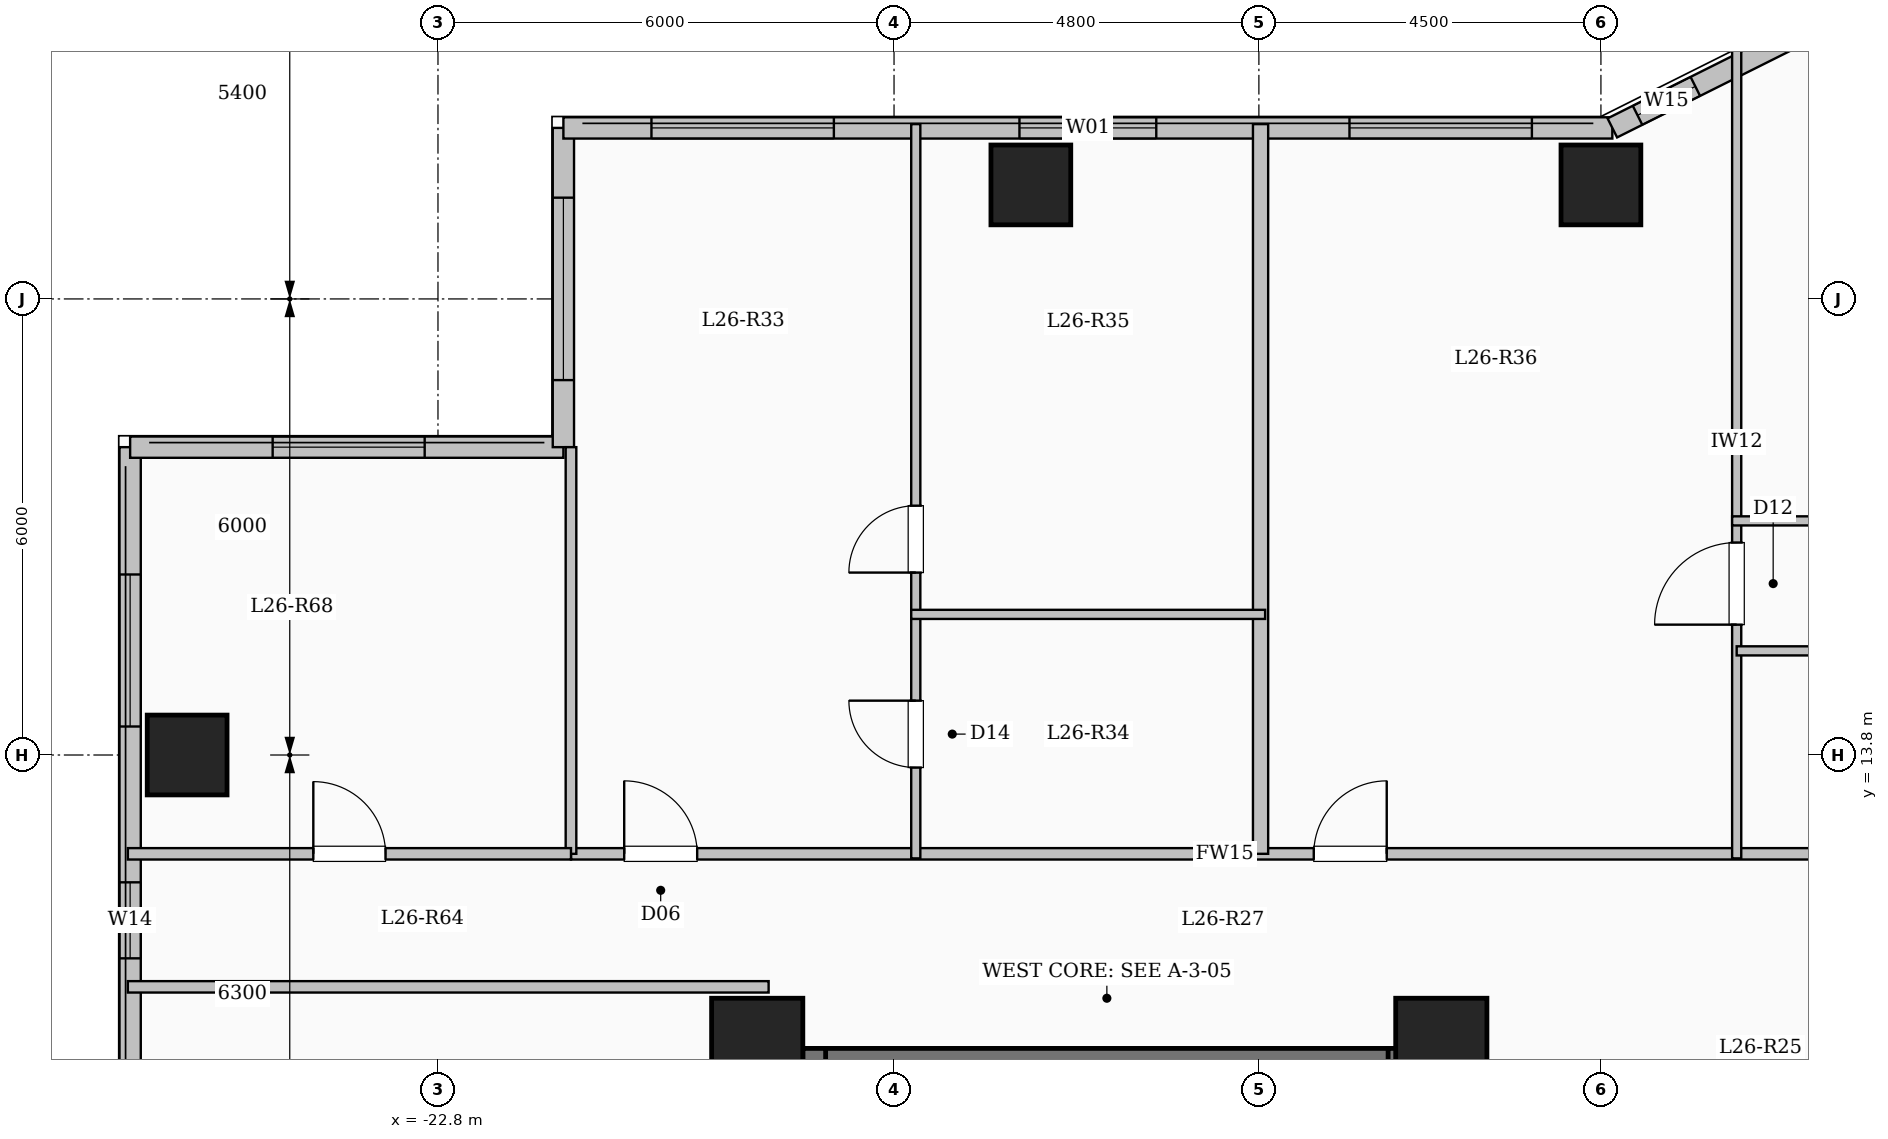
"""IFC4 building model, lengths in metres.
Left out: names, types, materials, properties, quantities, classifications, styles, units other than length and angle.
Written with IfcOpenShell. Run it as: python <this file> out.ifc"""

import sys

from ifc_helpers import new_model, si_unit, direction, frame, frame_2d, origin, origin_2d, place, context, subcontext, project, spatial, rectangle, extrude, element, fill, save


model = new_model("IFC4")
c1 = context("Model", 3, precision=1e-05, world=origin(), true_north=direction((0.0, 1.0)))
c2 = subcontext(c1, "Body", "Model", "MODEL_VIEW")
j1 = project(units=[si_unit("LENGTHUNIT", "METRE"), si_unit("PLANEANGLEUNIT", "RADIAN")], contexts=[c1])
p1 = place(None, origin())
s1 = spatial("IfcSite", under=j1, at=p1, CompositionType="ELEMENT")
p2 = place(p1, origin())
s2 = spatial("IfcBuilding", under=s1, at=p2, CompositionType="ELEMENT")
p3 = place(p2, frame((0.0, 0.0, 98.4)))
s3 = spatial("IfcBuildingStorey", under=s2, at=p3, CompositionType="ELEMENT", Elevation=98.4)
for number, where, z_axis, x_axis in (
    (1, (-9.6, 10.0, 0.0), (0.0, 0.0, 1.0), (1.0, 0.0, 0.0)),
    (2, (-18.6, 10.0, 0.0), (0.0, 0.0, 1.0), (1.0, 0.0, 0.0)),
):
    element("IfcColumn", number, at=place(p3, frame(where, z_axis=z_axis, x_axis=x_axis)), inside=s3, PredefinedType="COLUMN", context=c2, shape_type="SweptSolid", body=[
        extrude(rectangle(XDim=1.2, YDim=1.2, at=origin_2d()), origin(), (0.0, 0.0, 1.0), 3.35),
    ])
for number, where, z_axis, x_axis in (
    (3, (-15.0, 21.3, 0.0), (0.0, 0.0, 1.0), (1.0, 0.0, 0.0)),
    (4, (-7.5, 21.3, 0.0), (0.0, 0.0, 1.0), (1.0, 0.0, 0.0)),
    (5, (-26.1, 13.8, 0.0), (0.0, 0.0, 1.0), (1.0, 0.0, 0.0)),
):
    element("IfcColumn", number, at=place(p3, frame(where, z_axis=z_axis, x_axis=x_axis)), inside=s3, PredefinedType="COLUMN", context=c2, shape_type="SweptSolid", body=[
        extrude(rectangle(XDim=1.05, YDim=1.05, at=origin_2d()), origin(), (0.0, 0.0, 1.0), 3.35),
    ])
p4 = place(p3, frame((-26.85, -17.85, 0.0), z_axis=(0.0, 0.0, 1.0), x_axis=(0.0, 1.0, 0.0)))
e6 = element("IfcWall", 6, at=p4, inside=s3, PredefinedType="SOLIDWALL", context=c2, shape_type="SweptSolid", body=[
    extrude(rectangle(XDim=35.7, YDim=0.28, at=frame_2d((17.85, 0.0))), origin(), (0.0, 0.0, 1.0), 3.1),
])
p5 = place(p4, frame((2.55, 0.0, 0.9)))
e7 = element("IfcOpeningElement", 7, at=p5, cuts=e6, PredefinedType="OPENING", context=c2, shape_type="SweptSolid", body=[
    extrude(rectangle(XDim=2.4, YDim=1.8, at=frame_2d((1.2, 0.9))), frame((0.0, 0.15, 0.0), z_axis=(0.0, -1.0, 0.0), x_axis=(1.0, 0.0, 0.0)), (0.0, 0.0, 1.0), 0.3),
])
p6 = place(p4, frame((8.343, 0.0, 0.9)))
e8 = element("IfcOpeningElement", 8, at=p6, cuts=e6, PredefinedType="OPENING", context=c2, shape_type="SweptSolid", body=[
    extrude(rectangle(XDim=1.5, YDim=1.65, at=frame_2d((0.75, 0.825))), frame((0.0, 0.15, 0.0), z_axis=(0.0, -1.0, 0.0), x_axis=(1.0, 0.0, 0.0)), (0.0, 0.0, 1.0), 0.3),
])
p7 = place(p4, frame((18.6, 0.0, 0.9)))
e9 = element("IfcOpeningElement", 9, at=p7, cuts=e6, PredefinedType="OPENING", context=c2, shape_type="SweptSolid", body=[
    extrude(rectangle(XDim=2.0, YDim=1.7, at=frame_2d((1.0, 0.85))), frame((0.0, 0.15, 0.0), z_axis=(0.0, -1.0, 0.0), x_axis=(1.0, 0.0, 0.0)), (0.0, 0.0, 1.0), 0.3),
])
p8 = place(p4, frame((28.975, 0.0, 0.95)))
e10 = element("IfcOpeningElement", 10, at=p8, cuts=e6, PredefinedType="OPENING", context=c2, shape_type="SweptSolid", body=[
    extrude(rectangle(XDim=1.0, YDim=1.5, at=frame_2d((0.5, 0.75))), frame((0.0, 0.15, 0.0), z_axis=(0.0, -1.0, 0.0), x_axis=(1.0, 0.0, 0.0)), (0.0, 0.0, 1.0), 0.3),
])
p9 = place(p4, frame((32.025, 0.0, 0.9)))
e11 = element("IfcOpeningElement", 11, at=p9, cuts=e6, PredefinedType="OPENING", context=c2, shape_type="SweptSolid", body=[
    extrude(rectangle(XDim=2.0, YDim=1.7, at=frame_2d((1.0, 0.85))), frame((0.0, 0.15, 0.0), z_axis=(0.0, -1.0, 0.0), x_axis=(1.0, 0.0, 0.0)), (0.0, 0.0, 1.0), 0.3),
])
p10 = place(p3, frame((-26.85, 17.85, 0.0), z_axis=(0.0, 0.0, 1.0), x_axis=(1.0, 0.0, 0.0)))
e12 = element("IfcWall", 12, at=p10, inside=s3, PredefinedType="SOLIDWALL", context=c2, shape_type="SweptSolid", body=[
    extrude(rectangle(XDim=5.7, YDim=0.28, at=frame_2d((2.85, 0.0))), origin(), (0.0, 0.0, 1.0), 3.1),
])
p11 = place(p10, frame((1.875, 0.0, 0.9)))
e13 = element("IfcOpeningElement", 13, at=p11, cuts=e12, PredefinedType="OPENING", context=c2, shape_type="SweptSolid", body=[
    extrude(rectangle(XDim=2.0, YDim=1.7, at=frame_2d((1.0, 0.85))), frame((0.0, 0.15, 0.0), z_axis=(0.0, -1.0, 0.0), x_axis=(1.0, 0.0, 0.0)), (0.0, 0.0, 1.0), 0.3),
])
p12 = place(p3, frame((-21.15, 17.85, 0.0), z_axis=(0.0, 0.0, 1.0), x_axis=(0.0, 1.0, 0.0)))
e14 = element("IfcWall", 14, at=p12, inside=s3, PredefinedType="SOLIDWALL", context=c2, shape_type="SweptSolid", body=[
    extrude(rectangle(XDim=4.2, YDim=0.28, at=frame_2d((2.1, 0.0))), origin(), (0.0, 0.0, 1.0), 3.1),
])
p13 = place(p12, frame((0.882, 0.0, 0.9)))
e15 = element("IfcOpeningElement", 15, at=p13, cuts=e14, PredefinedType="OPENING", context=c2, shape_type="SweptSolid", body=[
    extrude(rectangle(XDim=2.4, YDim=1.8, at=frame_2d((1.2, 0.9))), frame((0.0, 0.15, 0.0), z_axis=(0.0, -1.0, 0.0), x_axis=(1.0, 0.0, 0.0)), (0.0, 0.0, 1.0), 0.3),
])
p14 = place(p3, frame((-21.15, 22.05, 0.0), z_axis=(0.0, 0.0, 1.0), x_axis=(1.0, 0.0, 0.0)))
e16 = element("IfcWall", 16, at=p14, inside=s3, PredefinedType="SOLIDWALL", context=c2, shape_type="SweptSolid", body=[
    extrude(rectangle(XDim=13.8, YDim=0.28, at=frame_2d((6.9, 0.0))), origin(), (0.0, 0.0, 1.0), 3.1),
])
p15 = place(p14, frame((1.158, 0.0, 0.9)))
e17 = element("IfcOpeningElement", 17, at=p15, cuts=e16, PredefinedType="OPENING", context=c2, shape_type="SweptSolid", body=[
    extrude(rectangle(XDim=2.4, YDim=1.8, at=frame_2d((1.2, 0.9))), frame((0.0, 0.15, 0.0), z_axis=(0.0, -1.0, 0.0), x_axis=(1.0, 0.0, 0.0)), (0.0, 0.0, 1.0), 0.3),
])
p16 = place(p14, frame((6.0, 0.0, 0.9)))
e18 = element("IfcOpeningElement", 18, at=p16, cuts=e16, PredefinedType="OPENING", context=c2, shape_type="SweptSolid", body=[
    extrude(rectangle(XDim=1.8, YDim=1.65, at=frame_2d((0.9, 0.825))), frame((0.0, 0.15, 0.0), z_axis=(0.0, -1.0, 0.0), x_axis=(1.0, 0.0, 0.0)), (0.0, 0.0, 1.0), 0.3),
])
p17 = place(p14, frame((10.342, 0.0, 0.9)))
e19 = element("IfcOpeningElement", 19, at=p17, cuts=e16, PredefinedType="OPENING", context=c2, shape_type="SweptSolid", body=[
    extrude(rectangle(XDim=2.4, YDim=1.8, at=frame_2d((1.2, 0.9))), frame((0.0, 0.15, 0.0), z_axis=(0.0, -1.0, 0.0), x_axis=(1.0, 0.0, 0.0)), (0.0, 0.0, 1.0), 0.3),
])
p18 = place(p3, frame((-7.35, 22.05, 0.0), z_axis=(0.0, 0.0, 1.0), x_axis=(0.894427191, 0.4472135955, 0.0)))
e20 = element("IfcWall", 20, at=p18, inside=s3, PredefinedType="SOLIDWALL", context=c2, shape_type="SweptSolid", body=[
    extrude(rectangle(XDim=3.354, YDim=0.28, at=frame_2d((1.677, 0.0))), origin(), (0.0, 0.0, 1.0), 3.1),
])
p19 = place(p18, frame((0.371, 0.0, 0.95)))
e21 = element("IfcOpeningElement", 21, at=p19, cuts=e20, PredefinedType="OPENING", context=c2, shape_type="SweptSolid", body=[
    extrude(rectangle(XDim=0.85, YDim=1.5, at=frame_2d((0.425, 0.75))), frame((0.0, 0.15, 0.0), z_axis=(0.0, -1.0, 0.0), x_axis=(1.0, 0.0, 0.0)), (0.0, 0.0, 1.0), 0.3),
])
p20 = place(p3, frame((-18.0, 9.79, 0.0), z_axis=(0.0, 0.0, 1.0), x_axis=(1.0, 0.0, 0.0)))
e22 = element("IfcWall", 22, at=p20, inside=s3, PredefinedType="SHEAR", context=c2, shape_type="SweptSolid", body=[
    extrude(rectangle(XDim=8.0, YDim=0.3, at=frame_2d((4.0, 0.0))), origin(), (0.0, 0.0, 1.0), 3.35),
])
for number, where, z_axis, x_axis in (
    (23, (-17.85, 6.35, 0.0), (0.0, 0.0, 1.0), (0.0, 1.0, 0.0)),
    (24, (-10.15, 6.35, 0.0), (0.0, 0.0, 1.0), (0.0, 1.0, 0.0)),
):
    element("IfcWall", number, at=place(p3, frame(where, z_axis=z_axis, x_axis=x_axis)), inside=s3, PredefinedType="SHEAR", context=c2, shape_type="SweptSolid", body=[
        extrude(rectangle(XDim=3.59, YDim=0.3, at=frame_2d((1.795, 0.0))), origin(), (0.0, 0.0, 1.0), 3.35),
    ])
p21 = place(p3, frame((-21.05, 12.5, 0.0), z_axis=(0.0, 0.0, 1.0), x_axis=(1.0, 0.0, 0.0)))
e25 = element("IfcWall", 25, at=p21, inside=s3, PredefinedType="PARTITIONING", context=c2, shape_type="SweptSolid", body=[
    extrude(rectangle(XDim=17.2, YDim=0.15, at=frame_2d((8.6, 0.0))), origin(), (0.0, 0.0, 1.0), 3.1),
])
p22 = place(p21, frame((0.7, 0.0, 0.0)))
e26 = element("IfcOpeningElement", 26, at=p22, cuts=e25, PredefinedType="OPENING", context=c2, shape_type="SweptSolid", body=[
    extrude(rectangle(XDim=0.96, YDim=2.15, at=frame_2d((0.48, 1.075))), frame((0.0, 0.085, 0.0), z_axis=(0.0, -1.0, 0.0), x_axis=(1.0, 0.0, 0.0)), (0.0, 0.0, 1.0), 0.17),
])
p23 = place(p21, frame((9.772, 0.0, 0.0)))
e27 = element("IfcOpeningElement", 27, at=p23, cuts=e25, PredefinedType="OPENING", context=c2, shape_type="SweptSolid", body=[
    extrude(rectangle(XDim=0.96, YDim=2.15, at=frame_2d((0.48, 1.075))), frame((0.0, 0.085, 0.0), z_axis=(0.0, -1.0, 0.0), x_axis=(1.0, 0.0, 0.0)), (0.0, 0.0, 1.0), 0.17),
])
p24 = place(p3, frame((-11.978, 12.5, 0.0), z_axis=(0.0, 0.0, 1.0), x_axis=(0.0, 1.0, 0.0)))
e28 = element("IfcWall", 28, at=p24, inside=s3, PredefinedType="SOLIDWALL", context=c2, shape_type="SweptSolid", body=[
    extrude(rectangle(XDim=9.6, YDim=0.2, at=frame_2d((4.8, 0.0))), origin(), (0.0, 0.0, 1.0), 3.1),
])
p25 = place(p3, frame((-16.514, 12.44, 0.0), z_axis=(0.0, 0.0, 1.0), x_axis=(0.0, 1.0, 0.0)))
e29 = element("IfcWall", 29, at=p25, inside=s3, PredefinedType="PARTITIONING", context=c2, shape_type="SweptSolid", body=[
    extrude(rectangle(XDim=3.21, YDim=0.12, at=frame_2d((1.605, 0.0))), origin(), (0.0, 0.0, 1.0), 3.1),
])
p26 = place(p25, frame((1.195, 0.0, 0.0)))
e30 = element("IfcOpeningElement", 30, at=p26, cuts=e29, PredefinedType="OPENING", context=c2, shape_type="SweptSolid", body=[
    extrude(rectangle(XDim=0.88, YDim=2.1, at=frame_2d((0.44, 1.05))), frame((0.0, 0.07, 0.0), z_axis=(0.0, -1.0, 0.0), x_axis=(1.0, 0.0, 0.0)), (0.0, 0.0, 1.0), 0.14),
])
p27 = place(p3, frame((-16.514, 15.65, 0.0), z_axis=(0.0, 0.0, 1.0), x_axis=(0.0, 1.0, 0.0)))
e31 = element("IfcWall", 31, at=p27, inside=s3, PredefinedType="PARTITIONING", context=c2, shape_type="SweptSolid", body=[
    extrude(rectangle(XDim=6.45, YDim=0.12, at=frame_2d((3.225, 0.0))), origin(), (0.0, 0.0, 1.0), 3.1),
])
p28 = place(p27, frame((0.55, 0.0, 0.0)))
e32 = element("IfcOpeningElement", 32, at=p28, cuts=e31, PredefinedType="OPENING", context=c2, shape_type="SweptSolid", body=[
    extrude(rectangle(XDim=0.88, YDim=2.1, at=frame_2d((0.44, 1.05))), frame((0.0, 0.07, 0.0), z_axis=(0.0, -1.0, 0.0), x_axis=(1.0, 0.0, 0.0)), (0.0, 0.0, 1.0), 0.14),
])
p29 = place(p3, frame((-16.574, 15.65, 0.0), z_axis=(0.0, 0.0, 1.0), x_axis=(1.0, 0.0, 0.0)))
e33 = element("IfcWall", 33, at=p29, inside=s3, PredefinedType="PARTITIONING", context=c2, shape_type="SweptSolid", body=[
    extrude(rectangle(XDim=4.656, YDim=0.12, at=frame_2d((2.328, 0.0))), origin(), (0.0, 0.0, 1.0), 3.1),
])
p30 = place(p3, frame((-5.714, 12.44, 0.0), z_axis=(0.0, 0.0, 1.0), x_axis=(0.0, 1.0, 0.0)))
e34 = element("IfcWall", 34, at=p30, inside=s3, PredefinedType="PARTITIONING", context=c2, shape_type="SweptSolid", body=[
    extrude(rectangle(XDim=10.964, YDim=0.12, at=frame_2d((5.482, 0.0))), origin(), (0.0, 0.0, 1.0), 3.1),
])
p31 = place(p30, frame((3.075, 0.0, 0.0)))
e35 = element("IfcOpeningElement", 35, at=p31, cuts=e34, PredefinedType="OPENING", context=c2, shape_type="SweptSolid", body=[
    extrude(rectangle(XDim=1.08, YDim=2.15, at=frame_2d((0.54, 1.075))), frame((0.0, 0.07, 0.0), z_axis=(0.0, -1.0, 0.0), x_axis=(1.0, 0.0, 0.0)), (0.0, 0.0, 1.0), 0.14),
])
p32 = place(p3, frame((-5.714, 15.17, 0.0), z_axis=(0.0, 0.0, 1.0), x_axis=(1.0, 0.0, 0.0)))
e36 = element("IfcWall", 36, at=p32, inside=s3, PredefinedType="PARTITIONING", context=c2, shape_type="SweptSolid", body=[
    extrude(rectangle(XDim=3.536, YDim=0.12, at=frame_2d((1.768, 0.0))), origin(), (0.0, 0.0, 1.0), 3.1),
])
p33 = place(p32, frame((1.328, 0.0, 0.0)))
e37 = element("IfcOpeningElement", 37, at=p33, cuts=e36, PredefinedType="OPENING", context=c2, shape_type="SweptSolid", body=[
    extrude(rectangle(XDim=0.88, YDim=2.1, at=frame_2d((0.44, 1.05))), frame((0.0, 0.07, 0.0), z_axis=(0.0, -1.0, 0.0), x_axis=(1.0, 0.0, 0.0)), (0.0, 0.0, 1.0), 0.14),
])
p34 = place(p3, frame((-5.774, 16.88, 0.0), z_axis=(0.0, 0.0, 1.0), x_axis=(1.0, 0.0, 0.0)))
e38 = element("IfcWall", 38, at=p34, inside=s3, PredefinedType="PARTITIONING", context=c2, shape_type="SweptSolid", body=[
    extrude(rectangle(XDim=6.384, YDim=0.12, at=frame_2d((3.192, 0.0))), origin(), (0.0, 0.0, 1.0), 3.1),
])
p35 = place(p34, frame((2.662, 0.0, 0.0)))
e39 = element("IfcOpeningElement", 39, at=p35, cuts=e38, PredefinedType="OPENING", context=c2, shape_type="SweptSolid", body=[
    extrude(rectangle(XDim=0.88, YDim=2.1, at=frame_2d((0.44, 1.05))), frame((0.0, 0.07, 0.0), z_axis=(0.0, -1.0, 0.0), x_axis=(1.0, 0.0, 0.0)), (0.0, 0.0, 1.0), 0.14),
])
p36 = place(p3, frame((-26.88, 10.75, 0.0), z_axis=(0.0, 0.0, 1.0), x_axis=(1.0, 0.0, 0.0)))
e40 = element("IfcWall", 40, at=p36, inside=s3, PredefinedType="PARTITIONING", context=c2, shape_type="SweptSolid", body=[
    extrude(rectangle(XDim=8.43, YDim=0.15, at=frame_2d((4.215, 0.0))), origin(), (0.0, 0.0, 1.0), 3.1),
])
p37 = place(p3, frame((-21.05, 12.5, 0.0), z_axis=(0.0, 0.0, 1.0), x_axis=(0.0, 1.0, 0.0)))
e41 = element("IfcWall", 41, at=p37, inside=s3, PredefinedType="PARTITIONING", context=c2, shape_type="SweptSolid", body=[
    extrude(rectangle(XDim=5.35, YDim=0.14, at=frame_2d((2.675, 0.0))), origin(), (0.0, 0.0, 1.0), 3.1),
])
p38 = place(p3, frame((-26.88, 12.5, 0.0), z_axis=(0.0, 0.0, 1.0), x_axis=(1.0, 0.0, 0.0)))
e42 = element("IfcWall", 42, at=p38, inside=s3, PredefinedType="PARTITIONING", context=c2, shape_type="SweptSolid", body=[
    extrude(rectangle(XDim=5.83, YDim=0.15, at=frame_2d((2.915, 0.0))), origin(), (0.0, 0.0, 1.0), 3.1),
])
p39 = place(p38, frame((2.44, 0.0, 0.0)))
e43 = element("IfcOpeningElement", 43, at=p39, cuts=e42, PredefinedType="OPENING", context=c2, shape_type="SweptSolid", body=[
    extrude(rectangle(XDim=0.95, YDim=2.15, at=frame_2d((0.475, 1.075))), frame((0.0, 0.085, 0.0), z_axis=(0.0, -1.0, 0.0), x_axis=(1.0, 0.0, 0.0)), (0.0, 0.0, 1.0), 0.17),
])
p40 = place(p8, origin())
e44 = element("IfcWindow", 44, at=p40, inside=s3, PartitioningType="SINGLE_PANEL", PredefinedType="WINDOW", context=c2, shape_type="SweptSolid", body=[
    extrude(rectangle(XDim=1.0, YDim=1.5, at=frame_2d((0.5, 0.75))), frame((0.0, 0.03, 0.0), z_axis=(0.0, -1.0, 0.0), x_axis=(1.0, 0.0, 0.0)), (0.0, 0.0, 1.0), 0.06),
])
fill(e10, e44)
p41 = place(p9, origin())
e45 = element("IfcWindow", 45, at=p41, inside=s3, PartitioningType="SINGLE_PANEL", PredefinedType="WINDOW", context=c2, shape_type="SweptSolid", body=[
    extrude(rectangle(XDim=2.0, YDim=1.7, at=frame_2d((1.0, 0.85))), frame((0.0, 0.03, 0.0), z_axis=(0.0, -1.0, 0.0), x_axis=(1.0, 0.0, 0.0)), (0.0, 0.0, 1.0), 0.06),
])
fill(e11, e45)
p42 = place(p11, origin())
e46 = element("IfcWindow", 46, at=p42, inside=s3, PartitioningType="SINGLE_PANEL", PredefinedType="WINDOW", context=c2, shape_type="SweptSolid", body=[
    extrude(rectangle(XDim=2.0, YDim=1.7, at=frame_2d((1.0, 0.85))), frame((0.0, 0.03, 0.0), z_axis=(0.0, -1.0, 0.0), x_axis=(1.0, 0.0, 0.0)), (0.0, 0.0, 1.0), 0.06),
])
fill(e13, e46)
p43 = place(p13, origin())
e47 = element("IfcWindow", 47, at=p43, inside=s3, PartitioningType="SINGLE_PANEL", PredefinedType="WINDOW", context=c2, shape_type="SweptSolid", body=[
    extrude(rectangle(XDim=2.4, YDim=1.8, at=frame_2d((1.2, 0.9))), frame((0.0, 0.03, 0.0), z_axis=(0.0, -1.0, 0.0), x_axis=(1.0, 0.0, 0.0)), (0.0, 0.0, 1.0), 0.06),
])
fill(e15, e47)
p44 = place(p15, origin())
e48 = element("IfcWindow", 48, at=p44, inside=s3, PartitioningType="SINGLE_PANEL", PredefinedType="WINDOW", context=c2, shape_type="SweptSolid", body=[
    extrude(rectangle(XDim=2.4, YDim=1.8, at=frame_2d((1.2, 0.9))), frame((0.0, 0.03, 0.0), z_axis=(0.0, -1.0, 0.0), x_axis=(1.0, 0.0, 0.0)), (0.0, 0.0, 1.0), 0.06),
])
fill(e17, e48)
p45 = place(p16, origin())
e49 = element("IfcWindow", 49, at=p45, inside=s3, PartitioningType="SINGLE_PANEL", PredefinedType="WINDOW", context=c2, shape_type="SweptSolid", body=[
    extrude(rectangle(XDim=1.8, YDim=1.65, at=frame_2d((0.9, 0.825))), frame((0.0, 0.03, 0.0), z_axis=(0.0, -1.0, 0.0), x_axis=(1.0, 0.0, 0.0)), (0.0, 0.0, 1.0), 0.06),
])
fill(e18, e49)
p46 = place(p17, origin())
e50 = element("IfcWindow", 50, at=p46, inside=s3, PartitioningType="SINGLE_PANEL", PredefinedType="WINDOW", context=c2, shape_type="SweptSolid", body=[
    extrude(rectangle(XDim=2.4, YDim=1.8, at=frame_2d((1.2, 0.9))), frame((0.0, 0.03, 0.0), z_axis=(0.0, -1.0, 0.0), x_axis=(1.0, 0.0, 0.0)), (0.0, 0.0, 1.0), 0.06),
])
fill(e19, e50)
p47 = place(p19, origin())
e51 = element("IfcWindow", 51, at=p47, inside=s3, PartitioningType="SINGLE_PANEL", PredefinedType="WINDOW", context=c2, shape_type="SweptSolid", body=[
    extrude(rectangle(XDim=0.85, YDim=1.5, at=frame_2d((0.425, 0.75))), frame((0.0, 0.03, 0.0), z_axis=(0.0, -1.0, 0.0), x_axis=(1.0, 0.0, 0.0)), (0.0, 0.0, 1.0), 0.06),
])
fill(e21, e51)
p48 = place(p22, origin())
e52 = element("IfcDoor", 52, at=p48, inside=s3, OperationType="SINGLE_SWING_LEFT", PredefinedType="DOOR", context=c2, shape_type="SweptSolid", body=[
    extrude(rectangle(XDim=0.96, YDim=2.15, at=frame_2d((0.48, 1.075))), frame((0.0, 0.025, 0.0), z_axis=(0.0, -1.0, 0.0), x_axis=(1.0, 0.0, 0.0)), (0.0, 0.0, 1.0), 0.05),
])
fill(e26, e52)
p49 = place(p26, origin())
e53 = element("IfcDoor", 53, at=p49, inside=s3, OperationType="SINGLE_SWING_RIGHT", PredefinedType="DOOR", context=c2, shape_type="SweptSolid", body=[
    extrude(rectangle(XDim=0.88, YDim=2.1, at=frame_2d((0.44, 1.05))), frame((0.0, 0.025, 0.0), z_axis=(0.0, -1.0, 0.0), x_axis=(1.0, 0.0, 0.0)), (0.0, 0.0, 1.0), 0.05),
])
fill(e30, e53)
p50 = place(p28, origin())
e54 = element("IfcDoor", 54, at=p50, inside=s3, OperationType="SINGLE_SWING_LEFT", PredefinedType="DOOR", context=c2, shape_type="SweptSolid", body=[
    extrude(rectangle(XDim=0.88, YDim=2.1, at=frame_2d((0.44, 1.05))), frame((0.0, 0.025, 0.0), z_axis=(0.0, -1.0, 0.0), x_axis=(1.0, 0.0, 0.0)), (0.0, 0.0, 1.0), 0.05),
])
fill(e32, e54)
p51 = place(p23, origin())
e55 = element("IfcDoor", 55, at=p51, inside=s3, OperationType="SINGLE_SWING_RIGHT", PredefinedType="DOOR", context=c2, shape_type="SweptSolid", body=[
    extrude(rectangle(XDim=0.96, YDim=2.15, at=frame_2d((0.48, 1.075))), frame((0.0, 0.025, 0.0), z_axis=(0.0, -1.0, 0.0), x_axis=(1.0, 0.0, 0.0)), (0.0, 0.0, 1.0), 0.05),
])
fill(e27, e55)
p52 = place(p31, origin())
e56 = element("IfcDoor", 56, at=p52, inside=s3, OperationType="SINGLE_SWING_LEFT", PredefinedType="DOOR", context=c2, shape_type="SweptSolid", body=[
    extrude(rectangle(XDim=1.08, YDim=2.15, at=frame_2d((0.54, 1.075))), frame((0.0, 0.025, 0.0), z_axis=(0.0, -1.0, 0.0), x_axis=(1.0, 0.0, 0.0)), (0.0, 0.0, 1.0), 0.05),
])
fill(e35, e56)
p53 = place(p39, origin())
e57 = element("IfcDoor", 57, at=p53, inside=s3, OperationType="SINGLE_SWING_LEFT", PredefinedType="DOOR", context=c2, shape_type="SweptSolid", body=[
    extrude(rectangle(XDim=0.95, YDim=2.15, at=frame_2d((0.475, 1.075))), frame((0.0, 0.025, 0.0), z_axis=(0.0, -1.0, 0.0), x_axis=(1.0, 0.0, 0.0)), (0.0, 0.0, 1.0), 0.05),
])
fill(e43, e57)
save(model, sys.argv[1])
